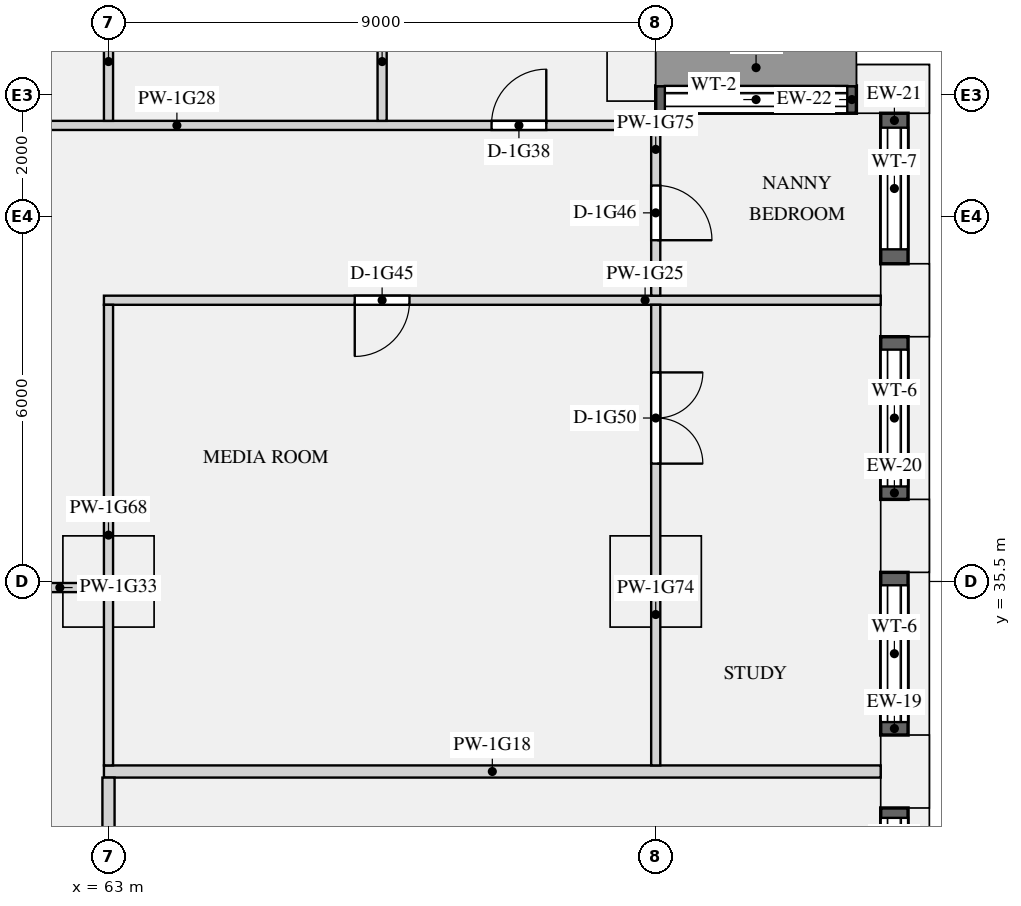
"""IFC4 building model, lengths in metres.
Left out: names, types, materials, properties, quantities, classifications, styles, units other than length and angle.
Written with IfcOpenShell. Run it as: python <this file> out.ifc"""

import sys

from ifc_helpers import new_model, si_unit, direction, frame, frame_2d, origin, origin_2d, place, context, subcontext, project, spatial, rectangle, extrude, element, fill, save


model = new_model("IFC4")
c1 = context("Model", 3, precision=1e-05, world=origin(), true_north=direction((0.0, 1.0)))
c2 = subcontext(c1, "Body", "Model", "MODEL_VIEW")
j1 = project(units=[si_unit("LENGTHUNIT", "METRE"), si_unit("PLANEANGLEUNIT", "RADIAN")], contexts=[c1])
p1 = place(None, origin())
s1 = spatial("IfcSite", under=j1, at=p1, CompositionType="ELEMENT")
p2 = place(p1, origin())
s2 = spatial("IfcBuilding", under=s1, at=p2, CompositionType="ELEMENT")
p3 = place(p2, frame((0.0, 0.0, 69.9)))
s3 = spatial("IfcBuildingStorey", under=s2, at=p3, CompositionType="ELEMENT", Elevation=69.9)
for number, where, z_axis, x_axis in (
    (1, (76.1, 32.375, 0.0), (0.0, 0.0, 1.0), (0.0, 1.0, 0.0)),
    (2, (76.1, 36.25, 0.0), (0.0, 0.0, 1.0), (0.0, 1.0, 0.0)),
    (3, (76.1, 40.125, 0.0), (0.0, 0.0, 1.0), (0.0, 1.0, 0.0)),
):
    element("IfcColumn", number, at=place(p3, frame(where, z_axis=z_axis, x_axis=x_axis)), inside=s3, PredefinedType="USERDEFINED", context=c2, shape_type="SweptSolid", body=[
        extrude(rectangle(XDim=1.2, YDim=0.8, at=origin_2d()), origin(), (0.0, 0.0, 1.0), 2.65),
    ])
p4 = place(p3, frame((75.9, 43.6, 0.0), z_axis=(0.0, 0.0, 1.0), x_axis=(-1.0, 0.0, 0.0)))
e4 = element("IfcColumn", 4, at=p4, inside=s3, PredefinedType="USERDEFINED", context=c2, shape_type="SweptSolid", body=[
    extrude(rectangle(XDim=1.2, YDim=0.8, at=origin_2d()), origin(), (0.0, 0.0, 1.0), 3.15),
])
p5 = place(p3, frame((71.6, 44.0, 0.0), z_axis=(0.0, 0.0, 1.0), x_axis=(0.0, 1.0, 0.0)))
e5 = element("IfcColumn", 5, at=p5, inside=s3, PredefinedType="USERDEFINED", context=c2, shape_type="SweptSolid", body=[
    extrude(rectangle(XDim=1.2, YDim=0.8, at=origin_2d()), origin(), (0.0, 0.0, 1.0), 2.65),
])
for number, where, z_axis, x_axis in (
    (6, (63.0, 35.5, 0.0), (0.0, 0.0, 1.0), (1.0, 0.0, 0.0)),
    (7, (72.0, 35.5, 0.0), (0.0, 0.0, 1.0), (1.0, 0.0, 0.0)),
):
    element("IfcColumn", number, at=place(p3, frame(where, z_axis=z_axis, x_axis=x_axis)), inside=s3, PredefinedType="COLUMN", context=c2, shape_type="SweptSolid", body=[
        extrude(rectangle(XDim=1.5, YDim=1.5, at=origin_2d()), origin(), (0.0, 0.0, 1.0), 3.15),
    ])
p6 = place(p3, frame((75.925, 29.7, 0.9), z_axis=(0.0, 0.0, 1.0), x_axis=(0.0, 1.0, 0.0)))
e8 = element("IfcWall", 8, at=p6, inside=s3, PredefinedType="SOLIDWALL", context=c2, shape_type="SweptSolid", body=[
    extrude(rectangle(XDim=2.075, YDim=0.45, at=frame_2d((1.038, 0.0))), origin(), (0.0, 0.0, 1.0), 1.75),
])
p7 = place(p6, frame((0.163, 0.0, 0.15)))
e9 = element("IfcOpeningElement", 9, at=p7, cuts=e8, PredefinedType="OPENING", context=c2, shape_type="SweptSolid", body=[
    extrude(rectangle(XDim=1.75, YDim=1.5, at=frame_2d((0.875, 0.75))), frame((0.0, 0.235, 0.0), z_axis=(0.0, -1.0, 0.0), x_axis=(1.0, 0.0, 0.0)), (0.0, 0.0, 1.0), 0.47),
])
p8 = place(p3, frame((75.925, 32.975, 0.9), z_axis=(0.0, 0.0, 1.0), x_axis=(0.0, 1.0, 0.0)))
e10 = element("IfcWall", 10, at=p8, inside=s3, PredefinedType="SOLIDWALL", context=c2, shape_type="SweptSolid", body=[
    extrude(rectangle(XDim=2.675, YDim=0.45, at=frame_2d((1.337, 0.0))), origin(), (0.0, 0.0, 1.0), 1.75),
])
p9 = place(p8, frame((0.212, 0.0, 0.15)))
e11 = element("IfcOpeningElement", 11, at=p9, cuts=e10, PredefinedType="OPENING", context=c2, shape_type="SweptSolid", body=[
    extrude(rectangle(XDim=2.25, YDim=1.5, at=frame_2d((1.125, 0.75))), frame((0.0, 0.235, 0.0), z_axis=(0.0, -1.0, 0.0), x_axis=(1.0, 0.0, 0.0)), (0.0, 0.0, 1.0), 0.47),
])
p10 = place(p3, frame((75.925, 36.85, 0.9), z_axis=(0.0, 0.0, 1.0), x_axis=(0.0, 1.0, 0.0)))
e12 = element("IfcWall", 12, at=p10, inside=s3, PredefinedType="SOLIDWALL", context=c2, shape_type="SweptSolid", body=[
    extrude(rectangle(XDim=2.675, YDim=0.45, at=frame_2d((1.337, 0.0))), origin(), (0.0, 0.0, 1.0), 1.75),
])
p11 = place(p10, frame((0.212, 0.0, 0.15)))
e13 = element("IfcOpeningElement", 13, at=p11, cuts=e12, PredefinedType="OPENING", context=c2, shape_type="SweptSolid", body=[
    extrude(rectangle(XDim=2.25, YDim=1.5, at=frame_2d((1.125, 0.75))), frame((0.0, 0.235, 0.0), z_axis=(0.0, -1.0, 0.0), x_axis=(1.0, 0.0, 0.0)), (0.0, 0.0, 1.0), 0.47),
])
p12 = place(p3, frame((75.925, 40.725, 0.9), z_axis=(0.0, 0.0, 1.0), x_axis=(0.0, 1.0, 0.0)))
e14 = element("IfcWall", 14, at=p12, inside=s3, PredefinedType="SOLIDWALL", context=c2, shape_type="SweptSolid", body=[
    extrude(rectangle(XDim=2.475, YDim=0.45, at=frame_2d((1.237, 0.0))), origin(), (0.0, 0.0, 1.0), 1.75),
])
p13 = place(p12, frame((0.238, 0.0, 0.15)))
e15 = element("IfcOpeningElement", 15, at=p13, cuts=e14, PredefinedType="OPENING", context=c2, shape_type="SweptSolid", body=[
    extrude(rectangle(XDim=2.0, YDim=1.5, at=frame_2d((1.0, 0.75))), frame((0.0, 0.235, 0.0), z_axis=(0.0, -1.0, 0.0), x_axis=(1.0, 0.0, 0.0)), (0.0, 0.0, 1.0), 0.47),
])
p14 = place(p3, frame((75.3, 43.425, 0.9), z_axis=(0.0, 0.0, 1.0), x_axis=(-1.0, 0.0, 0.0)))
e16 = element("IfcWall", 16, at=p14, inside=s3, PredefinedType="SOLIDWALL", context=c2, shape_type="SweptSolid", body=[
    extrude(rectangle(XDim=3.3, YDim=0.45, at=frame_2d((1.65, 0.0))), origin(), (0.0, 0.0, 1.0), 1.75),
])
p15 = place(p14, frame((0.15, 0.0, 0.15)))
e17 = element("IfcOpeningElement", 17, at=p15, cuts=e16, PredefinedType="OPENING", context=c2, shape_type="SweptSolid", body=[
    extrude(rectangle(XDim=3.0, YDim=1.5, at=frame_2d((1.5, 0.75))), frame((0.0, 0.235, 0.0), z_axis=(0.0, -1.0, 0.0), x_axis=(1.0, 0.0, 0.0)), (0.0, 0.0, 1.0), 0.47),
])
p16 = place(p3, frame((62.925, 32.375, 0.0), z_axis=(0.0, 0.0, 1.0), x_axis=(1.0, 0.0, 0.0)))
e18 = element("IfcWall", 18, at=p16, inside=s3, PredefinedType="PARTITIONING", context=c2, shape_type="SweptSolid", body=[
    extrude(rectangle(XDim=12.775, YDim=0.2, at=frame_2d((6.387, 0.0))), origin(), (0.0, 0.0, 1.0), 2.65),
])
p17 = place(p3, frame((62.925, 40.125, 0.0), z_axis=(0.0, 0.0, 1.0), x_axis=(1.0, 0.0, 0.0)))
e19 = element("IfcWall", 19, at=p17, inside=s3, PredefinedType="PARTITIONING", context=c2, shape_type="SweptSolid", body=[
    extrude(rectangle(XDim=12.775, YDim=0.15, at=frame_2d((6.387, 0.0))), origin(), (0.0, 0.0, 1.0), 2.65),
])
p18 = place(p17, frame((4.125, 0.0, 0.0)))
e20 = element("IfcOpeningElement", 20, at=p18, cuts=e19, PredefinedType="OPENING", context=c2, shape_type="SweptSolid", body=[
    extrude(rectangle(XDim=0.9, YDim=2.1, at=frame_2d((0.45, 1.05))), frame((0.0, 0.085, 0.0), z_axis=(0.0, -1.0, 0.0), x_axis=(1.0, 0.0, 0.0)), (0.0, 0.0, 1.0), 0.17),
])
p19 = place(p3, frame((53.925, 43.0, 0.0), z_axis=(0.0, 0.0, 1.0), x_axis=(1.0, 0.0, 0.0)))
e21 = element("IfcWall", 21, at=p19, inside=s3, PredefinedType="PARTITIONING", context=c2, shape_type="SweptSolid", body=[
    extrude(rectangle(XDim=18.0, YDim=0.15, at=frame_2d((9.0, 0.0))), origin(), (0.0, 0.0, 1.0), 2.65),
])
p20 = place(p19, frame((15.375, 0.0, 0.0)))
e22 = element("IfcOpeningElement", 22, at=p20, cuts=e21, PredefinedType="OPENING", context=c2, shape_type="SweptSolid", body=[
    extrude(rectangle(XDim=0.9, YDim=2.1, at=frame_2d((0.45, 1.05))), frame((0.0, 0.085, 0.0), z_axis=(0.0, -1.0, 0.0), x_axis=(1.0, 0.0, 0.0)), (0.0, 0.0, 1.0), 0.17),
])
p21 = place(p19, frame((4.125, 0.0, 0.0)))
e23 = element("IfcOpeningElement", 23, at=p21, cuts=e21, PredefinedType="OPENING", context=c2, shape_type="SweptSolid", body=[
    extrude(rectangle(XDim=0.9, YDim=2.1, at=frame_2d((0.45, 1.05))), frame((0.0, 0.085, 0.0), z_axis=(0.0, -1.0, 0.0), x_axis=(1.0, 0.0, 0.0)), (0.0, 0.0, 1.0), 0.17),
])
p22 = place(p3, frame((59.8, 35.4, 0.0), z_axis=(0.0, 0.0, 1.0), x_axis=(1.0, 0.0, 0.0)))
e24 = element("IfcWall", 24, at=p22, inside=s3, PredefinedType="PARTITIONING", context=c2, shape_type="SweptSolid", body=[
    extrude(rectangle(XDim=3.125, YDim=0.15, at=frame_2d((1.562, 0.0))), origin(), (0.0, 0.0, 1.0), 2.65),
])
p23 = place(p22, frame((0.775, 0.0, 0.0)))
e25 = element("IfcOpeningElement", 25, at=p23, cuts=e24, PredefinedType="OPENING", context=c2, shape_type="SweptSolid", body=[
    extrude(rectangle(XDim=0.9, YDim=2.1, at=frame_2d((0.45, 1.05))), frame((0.0, 0.085, 0.0), z_axis=(0.0, -1.0, 0.0), x_axis=(1.0, 0.0, 0.0)), (0.0, 0.0, 1.0), 0.17),
])
p24 = place(p3, frame((63.0, 32.475, 0.0), z_axis=(0.0, 0.0, 1.0), x_axis=(0.0, 1.0, 0.0)))
e26 = element("IfcWall", 26, at=p24, inside=s3, PredefinedType="PARTITIONING", context=c2, shape_type="SweptSolid", body=[
    extrude(rectangle(XDim=7.575, YDim=0.15, at=frame_2d((3.788, 0.0))), origin(), (0.0, 0.0, 1.0), 2.65),
])
p25 = place(p3, frame((63.0, 43.075, 0.0), z_axis=(0.0, 0.0, 1.0), x_axis=(0.0, 1.0, 0.0)))
e27 = element("IfcWall", 27, at=p25, inside=s3, PredefinedType="PARTITIONING", context=c2, shape_type="SweptSolid", body=[
    extrude(rectangle(XDim=4.625, YDim=0.15, at=frame_2d((2.312, 0.0))), origin(), (0.0, 0.0, 1.0), 2.65),
])
p26 = place(p25, frame((1.95, 0.0, 0.0)))
e28 = element("IfcOpeningElement", 28, at=p26, cuts=e27, PredefinedType="OPENING", context=c2, shape_type="SweptSolid", body=[
    extrude(rectangle(XDim=0.8, YDim=2.1, at=frame_2d((0.4, 1.05))), frame((0.0, 0.085, 0.0), z_axis=(0.0, -1.0, 0.0), x_axis=(1.0, 0.0, 0.0)), (0.0, 0.0, 1.0), 0.17),
])
p27 = place(p3, frame((63.0, 28.575, 0.0), z_axis=(0.0, 0.0, 1.0), x_axis=(0.0, 1.0, 0.0)))
e29 = element("IfcWall", 29, at=p27, inside=s3, PredefinedType="PARTITIONING", context=c2, shape_type="SweptSolid", body=[
    extrude(rectangle(XDim=3.7, YDim=0.2, at=frame_2d((1.85, 0.0))), origin(), (0.0, 0.0, 1.0), 2.65),
])
p28 = place(p3, frame((72.0, 32.475, 0.0), z_axis=(0.0, 0.0, 1.0), x_axis=(0.0, 1.0, 0.0)))
e30 = element("IfcWall", 30, at=p28, inside=s3, PredefinedType="PARTITIONING", context=c2, shape_type="SweptSolid", body=[
    extrude(rectangle(XDim=7.575, YDim=0.15, at=frame_2d((3.788, 0.0))), origin(), (0.0, 0.0, 1.0), 2.65),
])
p29 = place(p28, frame((4.963, 0.0, 0.0)))
e31 = element("IfcOpeningElement", 31, at=p29, cuts=e30, PredefinedType="OPENING", context=c2, shape_type="SweptSolid", body=[
    extrude(rectangle(XDim=1.5, YDim=2.1, at=frame_2d((0.75, 1.05))), frame((0.0, 0.085, 0.0), z_axis=(0.0, -1.0, 0.0), x_axis=(1.0, 0.0, 0.0)), (0.0, 0.0, 1.0), 0.17),
])
p30 = place(p3, frame((72.0, 40.2, 0.0), z_axis=(0.0, 0.0, 1.0), x_axis=(0.0, 1.0, 0.0)))
e32 = element("IfcWall", 32, at=p30, inside=s3, PredefinedType="PARTITIONING", context=c2, shape_type="SweptSolid", body=[
    extrude(rectangle(XDim=3.0, YDim=0.15, at=frame_2d((1.5, 0.0))), origin(), (0.0, 0.0, 1.0), 2.65),
])
p31 = place(p30, frame((0.912, 0.0, 0.0)))
e33 = element("IfcOpeningElement", 33, at=p31, cuts=e32, PredefinedType="OPENING", context=c2, shape_type="SweptSolid", body=[
    extrude(rectangle(XDim=0.9, YDim=2.1, at=frame_2d((0.45, 1.05))), frame((0.0, 0.085, 0.0), z_axis=(0.0, -1.0, 0.0), x_axis=(1.0, 0.0, 0.0)), (0.0, 0.0, 1.0), 0.17),
])
p32 = place(p3, frame((67.5, 43.075, 0.0), z_axis=(0.0, 0.0, 1.0), x_axis=(0.0, 1.0, 0.0)))
e34 = element("IfcWall", 34, at=p32, inside=s3, PredefinedType="PARTITIONING", context=c2, shape_type="SweptSolid", body=[
    extrude(rectangle(XDim=4.625, YDim=0.15, at=frame_2d((2.312, 0.0))), origin(), (0.0, 0.0, 1.0), 2.65),
])
p33 = place(p32, frame((1.95, 0.0, 0.0)))
e35 = element("IfcOpeningElement", 35, at=p33, cuts=e34, PredefinedType="OPENING", context=c2, shape_type="SweptSolid", body=[
    extrude(rectangle(XDim=0.8, YDim=2.1, at=frame_2d((0.4, 1.05))), frame((0.0, 0.085, 0.0), z_axis=(0.0, -1.0, 0.0), x_axis=(1.0, 0.0, 0.0)), (0.0, 0.0, 1.0), 0.17),
])
p34 = place(p7, origin())
e36 = element("IfcWindow", 36, at=p34, inside=s3, PartitioningType="SINGLE_PANEL", PredefinedType="WINDOW", context=c2, shape_type="SweptSolid", body=[
    extrude(rectangle(XDim=1.75, YDim=1.5, at=frame_2d((0.875, 0.75))), frame((0.0, -0.065, 0.0), z_axis=(0.0, -1.0, 0.0), x_axis=(1.0, 0.0, 0.0)), (0.0, 0.0, 1.0), 0.06),
])
fill(e9, e36)
p35 = place(p9, origin())
e37 = element("IfcWindow", 37, at=p35, inside=s3, PartitioningType="SINGLE_PANEL", PredefinedType="WINDOW", context=c2, shape_type="SweptSolid", body=[
    extrude(rectangle(XDim=2.25, YDim=1.5, at=frame_2d((1.125, 0.75))), frame((0.0, -0.065, 0.0), z_axis=(0.0, -1.0, 0.0), x_axis=(1.0, 0.0, 0.0)), (0.0, 0.0, 1.0), 0.06),
])
fill(e11, e37)
p36 = place(p11, origin())
e38 = element("IfcWindow", 38, at=p36, inside=s3, PartitioningType="SINGLE_PANEL", PredefinedType="WINDOW", context=c2, shape_type="SweptSolid", body=[
    extrude(rectangle(XDim=2.25, YDim=1.5, at=frame_2d((1.125, 0.75))), frame((0.0, -0.065, 0.0), z_axis=(0.0, -1.0, 0.0), x_axis=(1.0, 0.0, 0.0)), (0.0, 0.0, 1.0), 0.06),
])
fill(e13, e38)
p37 = place(p13, origin())
e39 = element("IfcWindow", 39, at=p37, inside=s3, PartitioningType="SINGLE_PANEL", PredefinedType="WINDOW", context=c2, shape_type="SweptSolid", body=[
    extrude(rectangle(XDim=2.0, YDim=1.5, at=frame_2d((1.0, 0.75))), frame((0.0, -0.065, 0.0), z_axis=(0.0, -1.0, 0.0), x_axis=(1.0, 0.0, 0.0)), (0.0, 0.0, 1.0), 0.06),
])
fill(e15, e39)
p38 = place(p15, origin())
e40 = element("IfcWindow", 40, at=p38, inside=s3, PartitioningType="SINGLE_PANEL", PredefinedType="WINDOW", context=c2, shape_type="SweptSolid", body=[
    extrude(rectangle(XDim=3.0, YDim=1.5, at=frame_2d((1.5, 0.75))), frame((0.0, -0.065, 0.0), z_axis=(0.0, -1.0, 0.0), x_axis=(1.0, 0.0, 0.0)), (0.0, 0.0, 1.0), 0.06),
])
fill(e17, e40)
p39 = place(p20, origin())
e41 = element("IfcDoor", 41, at=p39, inside=s3, OperationType="SINGLE_SWING_RIGHT", PredefinedType="DOOR", context=c2, shape_type="SweptSolid", body=[
    extrude(rectangle(XDim=0.9, YDim=2.1, at=frame_2d((0.45, 1.05))), frame((0.0, 0.025, 0.0), z_axis=(0.0, -1.0, 0.0), x_axis=(1.0, 0.0, 0.0)), (0.0, 0.0, 1.0), 0.05),
])
fill(e22, e41)
p40 = place(p18, frame((0.9, 0.0, 0.0), z_axis=(0.0, 0.0, 1.0), x_axis=(-1.0, 0.0, 0.0)))
e42 = element("IfcDoor", 42, at=p40, inside=s3, OperationType="SINGLE_SWING_RIGHT", PredefinedType="DOOR", context=c2, shape_type="SweptSolid", body=[
    extrude(rectangle(XDim=0.9, YDim=2.1, at=frame_2d((0.45, 1.05))), frame((0.0, 0.025, 0.0), z_axis=(0.0, -1.0, 0.0), x_axis=(1.0, 0.0, 0.0)), (0.0, 0.0, 1.0), 0.05),
])
fill(e20, e42)
p41 = place(p31, frame((0.9, 0.0, 0.0), z_axis=(0.0, 0.0, 1.0), x_axis=(-1.0, 0.0, 0.0)))
e43 = element("IfcDoor", 43, at=p41, inside=s3, OperationType="SINGLE_SWING_RIGHT", PredefinedType="DOOR", context=c2, shape_type="SweptSolid", body=[
    extrude(rectangle(XDim=0.9, YDim=2.1, at=frame_2d((0.45, 1.05))), frame((0.0, 0.025, 0.0), z_axis=(0.0, -1.0, 0.0), x_axis=(1.0, 0.0, 0.0)), (0.0, 0.0, 1.0), 0.05),
])
fill(e33, e43)
p42 = place(p29, frame((1.5, 0.0, 0.0), z_axis=(0.0, 0.0, 1.0), x_axis=(-1.0, 0.0, 0.0)))
e44 = element("IfcDoor", 44, at=p42, inside=s3, OperationType="DOUBLE_DOOR_SINGLE_SWING", PredefinedType="DOOR", context=c2, shape_type="SweptSolid", body=[
    extrude(rectangle(XDim=1.5, YDim=2.1, at=frame_2d((0.75, 1.05))), frame((0.0, 0.025, 0.0), z_axis=(0.0, -1.0, 0.0), x_axis=(1.0, 0.0, 0.0)), (0.0, 0.0, 1.0), 0.05),
])
fill(e31, e44)
save(model, sys.argv[1])
